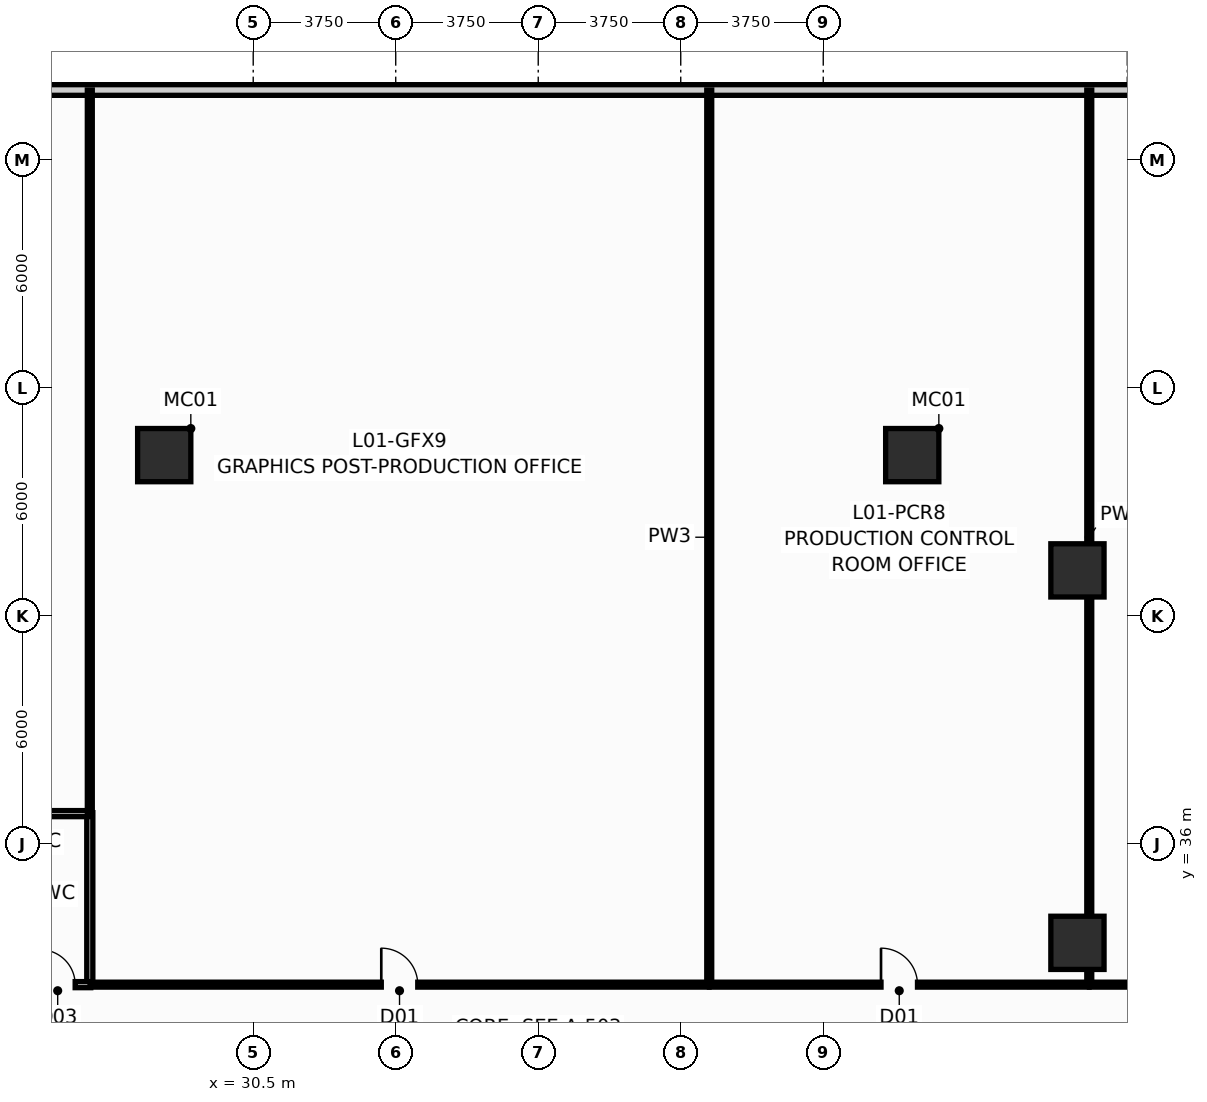
"""IFC4 building model, lengths in metres.
Left out: names, types, materials, properties, quantities, classifications, styles, units other than length and angle.
Written with IfcOpenShell. Run it as: python <this file> out.ifc"""

import sys

from ifc_helpers import new_model, si_unit, direction, frame, frame_2d, origin, origin_2d, place, context, subcontext, project, spatial, rectangle, hollow_rectangle, extrude, source, transform, mapped, element, fill, save


model = new_model("IFC4")
c1 = context("Model", 3, precision=1e-05, world=origin(), true_north=direction((0.0, 1.0)))
c2 = subcontext(c1, "Body", "Model", "MODEL_VIEW")
j1 = project(units=[si_unit("LENGTHUNIT", "METRE"), si_unit("PLANEANGLEUNIT", "RADIAN")], contexts=[c1])
p1 = place(None, origin())
s1 = spatial("IfcSite", under=j1, at=p1, CompositionType="ELEMENT")
p2 = place(p1, origin())
s2 = spatial("IfcBuilding", under=s1, at=p2, CompositionType="ELEMENT")
p3 = place(p2, frame((0.0, 0.0, 5.4)))
s3 = spatial("IfcBuildingStorey", under=s2, at=p3, CompositionType="ELEMENT", Elevation=5.4)
m1 = source(origin(), c2, "Body", "SweptSolid", [
    extrude(hollow_rectangle(XDim=1.4, YDim=1.4, WallThickness=0.08, at=origin_2d()), origin(), (0.0, 0.0, 1.0), 4.802),
])
for number, where, z_axis, x_axis in (
    (1, (47.842, 46.233, 0.0), (-0.024, 0.002, 1.0), (-0.074, -0.997, 0.0)),
    (2, (28.158, 46.233, 0.0), (0.024, 0.002, 1.0), (-0.074, 0.997, 0.0)),
):
    element("IfcColumn", number, at=place(p3, frame(where, z_axis=z_axis, x_axis=x_axis)), inside=s3, PredefinedType="COLUMN", context=c2, shape_type="MappedRepresentation", body=[
        mapped(m1, transform((0.0, 0.0, 0.0), scale=1.0)),
    ])
m2 = source(origin(), c2, "Body", "SweptSolid", [
    extrude(hollow_rectangle(XDim=1.4, YDim=1.4, WallThickness=0.08, at=origin_2d()), origin(), (0.0, 0.0, 1.0), 4.8),
])
for number, where, z_axis, x_axis in (
    (3, (52.189, 33.4, 0.0), (0.0, 0.0, 1.0), (1.0, 0.0, 0.0)),
    (4, (52.189, 43.2, 0.0), (0.0, 0.0, 1.0), (1.0, 0.0, 0.0)),
):
    element("IfcColumn", number, at=place(p3, frame(where, z_axis=z_axis, x_axis=x_axis)), inside=s3, PredefinedType="COLUMN", context=c2, shape_type="MappedRepresentation", body=[
        mapped(m2, transform((0.0, 0.0, 0.0), scale=1.0)),
    ])
p4 = place(p3, frame((5.086, 55.84, 0.0), z_axis=(0.0, 0.0, 1.0), x_axis=(1.0, 0.0, 0.0)))
e5 = element("IfcWall", 5, at=p4, inside=s3, PredefinedType="STANDARD", context=c2, shape_type="SweptSolid", body=[
    extrude(rectangle(XDim=71.828, YDim=0.28, at=frame_2d((35.914, 0.0))), origin(), (0.0, 0.0, 1.0), 4.48),
])
p5 = place(p3, frame((26.2, 32.275, 0.0), z_axis=(0.0, 0.0, 1.0), x_axis=(0.0, 1.0, 0.0)))
e6 = element("IfcWall", 6, at=p5, inside=s3, PredefinedType="PLUMBINGWALL", context=c2, shape_type="SweptSolid", body=[
    extrude(rectangle(XDim=4.55, YDim=0.16, at=frame_2d((2.275, 0.0))), origin(), (0.0, 0.0, 1.0), 4.48),
])
p6 = place(p3, frame((22.375, 32.3, 0.0), z_axis=(0.0, 0.0, 1.0), x_axis=(1.0, 0.0, 0.0)))
e7 = element("IfcWall", 7, at=p6, inside=s3, PredefinedType="PLUMBINGWALL", context=c2, shape_type="SweptSolid", body=[
    extrude(rectangle(XDim=3.85, YDim=0.16, at=frame_2d((1.925, 0.0))), origin(), (0.0, 0.0, 1.0), 4.48),
])
p7 = place(p6, frame((2.52, 0.0, 0.0)))
e8 = element("IfcOpeningElement", 8, at=p7, cuts=e7, PredefinedType="OPENING", context=c2, shape_type="SweptSolid", body=[
    extrude(rectangle(XDim=0.92, YDim=2.1, at=frame_2d((0.46, 1.05))), frame((0.0, 0.092, 0.0), z_axis=(0.0, -1.0, 0.0), x_axis=(1.0, 0.0, 0.0)), (0.0, 0.0, 1.0), 0.184),
])
p8 = place(p3, frame((22.375, 36.8, 0.0), z_axis=(0.0, 0.0, 1.0), x_axis=(1.0, 0.0, 0.0)))
e9 = element("IfcWall", 9, at=p8, inside=s3, PredefinedType="PLUMBINGWALL", context=c2, shape_type="SweptSolid", body=[
    extrude(rectangle(XDim=3.85, YDim=0.16, at=frame_2d((1.925, 0.0))), origin(), (0.0, 0.0, 1.0), 4.059),
])
p9 = place(p3, frame((52.5, 32.305, 0.0), z_axis=(0.0, 0.0, 1.0), x_axis=(0.0, 1.0, 0.0)))
e10 = element("IfcWall", 10, at=p9, inside=s3, PredefinedType="PARTITIONING", context=c2, shape_type="SweptSolid", body=[
    extrude(rectangle(XDim=23.535, YDim=0.13, at=frame_2d((11.768, 0.0))), origin(), (0.0, 0.0, 1.0), 3.465),
])
p10 = place(p3, frame((42.5, 32.305, 0.0), z_axis=(0.0, 0.0, 1.0), x_axis=(0.0, 1.0, 0.0)))
e11 = element("IfcWall", 11, at=p10, inside=s3, PredefinedType="PARTITIONING", context=c2, shape_type="SweptSolid", body=[
    extrude(rectangle(XDim=23.535, YDim=0.13, at=frame_2d((11.768, 0.0))), origin(), (0.0, 0.0, 1.0), 4.48),
])
p11 = place(p3, frame((26.2, 36.805, 0.0), z_axis=(0.0, 0.0, 1.0), x_axis=(0.0, 1.0, 0.0)))
e12 = element("IfcWall", 12, at=p11, inside=s3, PredefinedType="PARTITIONING", context=c2, shape_type="SweptSolid", body=[
    extrude(rectangle(XDim=19.035, YDim=0.13, at=frame_2d((9.518, 0.0))), origin(), (0.0, 0.0, 1.0), 4.48),
])
p12 = place(p3, frame((26.205, 32.3, 0.0), z_axis=(0.0, 0.0, 1.0), x_axis=(1.0, 0.0, 0.0)))
e13 = element("IfcWall", 13, at=p12, inside=s3, PredefinedType="PARTITIONING", context=c2, shape_type="SweptSolid", body=[
    extrude(rectangle(XDim=16.29, YDim=0.13, at=frame_2d((8.145, 0.0))), origin(), (0.0, 0.0, 1.0), 4.48),
])
p13 = place(p12, frame((7.665, 0.0, 0.0)))
e14 = element("IfcOpeningElement", 14, at=p13, cuts=e13, PredefinedType="OPENING", context=c2, shape_type="SweptSolid", body=[
    extrude(rectangle(XDim=0.96, YDim=2.15, at=frame_2d((0.48, 1.075))), frame((0.0, 0.077, 0.0), z_axis=(0.0, -1.0, 0.0), x_axis=(1.0, 0.0, 0.0)), (0.0, 0.0, 1.0), 0.154),
])
p14 = place(p3, frame((42.505, 32.3, 0.0), z_axis=(0.0, 0.0, 1.0), x_axis=(1.0, 0.0, 0.0)))
e15 = element("IfcWall", 15, at=p14, inside=s3, PredefinedType="PARTITIONING", context=c2, shape_type="SweptSolid", body=[
    extrude(rectangle(XDim=9.99, YDim=0.13, at=frame_2d((4.995, 0.0))), origin(), (0.0, 0.0, 1.0), 4.48),
])
p15 = place(p14, frame((4.515, 0.0, 0.0)))
e16 = element("IfcOpeningElement", 16, at=p15, cuts=e15, PredefinedType="OPENING", context=c2, shape_type="SweptSolid", body=[
    extrude(rectangle(XDim=0.96, YDim=2.15, at=frame_2d((0.48, 1.075))), frame((0.0, 0.077, 0.0), z_axis=(0.0, -1.0, 0.0), x_axis=(1.0, 0.0, 0.0)), (0.0, 0.0, 1.0), 0.154),
])
p16 = place(p3, frame((52.505, 32.3, 0.0), z_axis=(0.0, 0.0, 1.0), x_axis=(1.0, 0.0, 0.0)))
e17 = element("IfcWall", 17, at=p16, inside=s3, PredefinedType="PARTITIONING", context=c2, shape_type="SweptSolid", body=[
    extrude(rectangle(XDim=8.99, YDim=0.13, at=frame_2d((4.495, 0.0))), origin(), (0.0, 0.0, 1.0), 4.48),
])
p17 = place(p7, origin())
e18 = element("IfcDoor", 18, at=p17, inside=s3, OperationType="SINGLE_SWING_LEFT", PredefinedType="DOOR", context=c2, shape_type="SweptSolid", body=[
    extrude(rectangle(XDim=0.92, YDim=2.1, at=frame_2d((0.46, 1.05))), frame((0.0, 0.025, 0.0), z_axis=(0.0, -1.0, 0.0), x_axis=(1.0, 0.0, 0.0)), (0.0, 0.0, 1.0), 0.05),
])
fill(e8, e18)
p18 = place(p13, origin())
e19 = element("IfcDoor", 19, at=p18, inside=s3, OperationType="SINGLE_SWING_LEFT", PredefinedType="DOOR", context=c2, shape_type="SweptSolid", body=[
    extrude(rectangle(XDim=0.96, YDim=2.15, at=frame_2d((0.48, 1.075))), frame((0.0, 0.025, 0.0), z_axis=(0.0, -1.0, 0.0), x_axis=(1.0, 0.0, 0.0)), (0.0, 0.0, 1.0), 0.05),
])
fill(e14, e19)
p19 = place(p15, origin())
e20 = element("IfcDoor", 20, at=p19, inside=s3, OperationType="SINGLE_SWING_LEFT", PredefinedType="DOOR", context=c2, shape_type="SweptSolid", body=[
    extrude(rectangle(XDim=0.96, YDim=2.15, at=frame_2d((0.48, 1.075))), frame((0.0, 0.025, 0.0), z_axis=(0.0, -1.0, 0.0), x_axis=(1.0, 0.0, 0.0)), (0.0, 0.0, 1.0), 0.05),
])
fill(e16, e20)
save(model, sys.argv[1])
